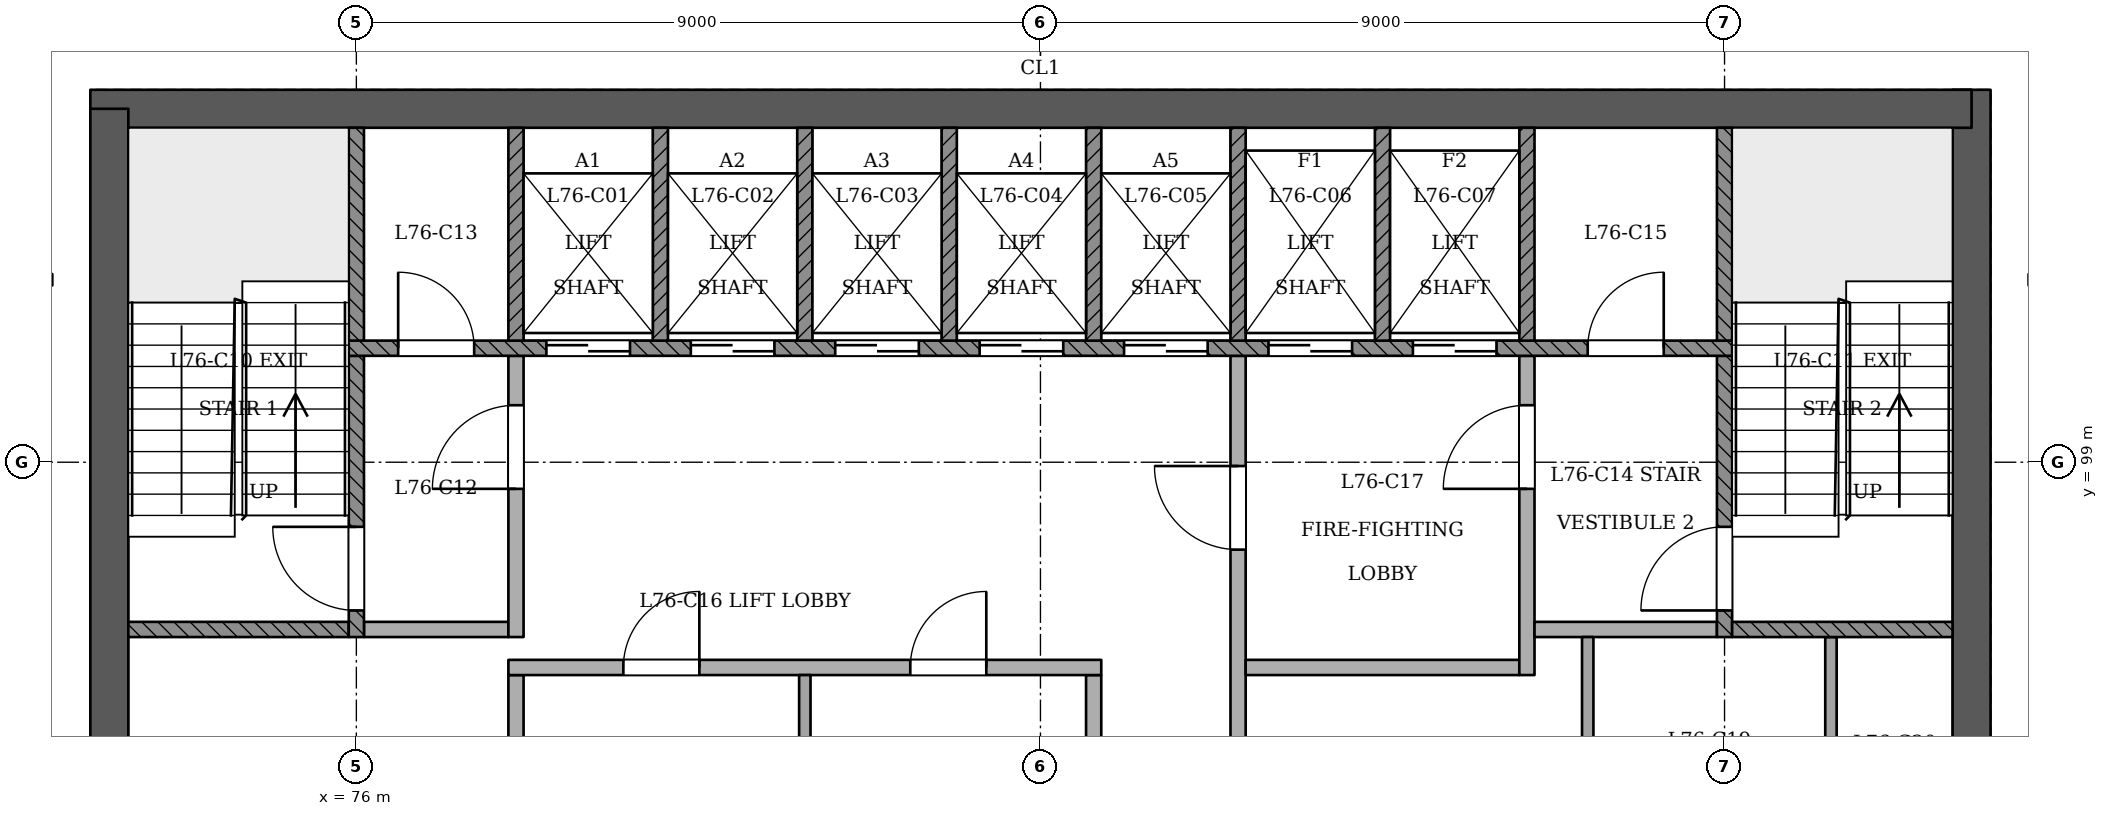
"""IFC4 building model, lengths in metres.
Left out: names, types, materials, properties, quantities, classifications, styles, units other than length and angle.
Written with IfcOpenShell. Run it as: python <this file> out.ifc"""

import sys

from ifc_helpers import new_model, si_unit, direction, frame, frame_2d, origin, place, context, subcontext, project, spatial, rectangle, extrude, element, fill, save


model = new_model("IFC4")
c1 = context("Model", 3, precision=1e-05, world=origin(), true_north=direction((0.0, 1.0)))
c2 = subcontext(c1, "Body", "Model", "MODEL_VIEW")
j1 = project(units=[si_unit("LENGTHUNIT", "METRE"), si_unit("PLANEANGLEUNIT", "RADIAN")], contexts=[c1])
p1 = place(None, origin())
s1 = spatial("IfcSite", under=j1, at=p1, CompositionType="ELEMENT")
p2 = place(p1, origin())
s2 = spatial("IfcBuilding", under=s1, at=p2, CompositionType="ELEMENT")
p3 = place(p2, frame((0.0, 0.0, 295.0)))
s3 = spatial("IfcBuildingStorey", under=s2, at=p3, CompositionType="ELEMENT", Elevation=295.0)
p4 = place(p3, frame((97.25, 93.15, 0.0), z_axis=(0.0, 0.0, 1.0), x_axis=(0.0, 1.0, 0.0)))
e1 = element("IfcWall", 1, at=p4, inside=s3, PredefinedType="SHEAR", context=c2, shape_type="SweptSolid", body=[
    extrude(rectangle(XDim=10.75, YDim=0.5, at=frame_2d((5.375, 0.0))), origin(), (0.0, 0.0, 1.0), 3.6),
])
p5 = place(p3, frame((97.25, 103.65, 0.0), z_axis=(0.0, 0.0, 1.0), x_axis=(-1.0, 0.0, 0.0)))
e2 = element("IfcWall", 2, at=p5, inside=s3, PredefinedType="SHEAR", context=c2, shape_type="SweptSolid", body=[
    extrude(rectangle(XDim=24.75, YDim=0.5, at=frame_2d((12.375, 0.0))), origin(), (0.0, 0.0, 1.0), 3.6),
])
p6 = place(p3, frame((72.75, 103.65, 0.0), z_axis=(0.0, 0.0, 1.0), x_axis=(0.0, -1.0, 0.0)))
e3 = element("IfcWall", 3, at=p6, inside=s3, PredefinedType="SHEAR", context=c2, shape_type="SweptSolid", body=[
    extrude(rectangle(XDim=10.75, YDim=0.5, at=frame_2d((5.375, 0.0))), origin(), (0.0, 0.0, 1.0), 3.6),
])
for number, where, z_axis, x_axis in (
    (4, (99.726, 101.401, 0.0), (0.0, 0.0, 1.0), (-1.0, 0.0, 0.0)),
    (5, (72.0, 101.401, 0.0), (0.0, 0.0, 1.0), (-1.0, -0.0, 0.0)),
):
    element("IfcWall", number, at=place(p3, frame(where, z_axis=z_axis, x_axis=x_axis)), inside=s3, PredefinedType="PARTITIONING", context=c2, shape_type="SweptSolid", body=[
        extrude(rectangle(XDim=1.726, YDim=0.15, at=frame_2d((0.863, 0.0))), origin(), (0.0, 0.0, 1.0), 3.2),
    ])
p7 = place(p3, frame((78.1, 93.4, 0.0), z_axis=(0.0, 0.0, 1.0), x_axis=(0.0, 1.0, 0.0)))
e6 = element("IfcWall", 6, at=p7, inside=s3, PredefinedType="PARTITIONING", context=c2, shape_type="SweptSolid", body=[
    extrude(rectangle(XDim=2.8, YDim=0.2, at=frame_2d((1.4, 0.0))), origin(), (0.0, 0.0, 1.0), 3.2),
])
p8 = place(p3, frame((81.9, 93.4, 0.0), z_axis=(0.0, 0.0, 1.0), x_axis=(0.0, 1.0, 0.0)))
e7 = element("IfcWall", 7, at=p8, inside=s3, PredefinedType="PARTITIONING", context=c2, shape_type="SweptSolid", body=[
    extrude(rectangle(XDim=2.8, YDim=0.15, at=frame_2d((1.4, 0.0))), origin(), (0.0, 0.0, 1.0), 3.2),
])
p9 = place(p3, frame((85.7, 93.4, 0.0), z_axis=(0.0, 0.0, 1.0), x_axis=(0.0, 1.0, 0.0)))
e8 = element("IfcWall", 8, at=p9, inside=s3, PredefinedType="PARTITIONING", context=c2, shape_type="SweptSolid", body=[
    extrude(rectangle(XDim=2.8, YDim=0.2, at=frame_2d((1.4, 0.0))), origin(), (0.0, 0.0, 1.0), 3.2),
])
p10 = place(p3, frame((87.6, 93.4, 0.0), z_axis=(0.0, 0.0, 1.0), x_axis=(0.0, 1.0, 0.0)))
e9 = element("IfcWall", 9, at=p10, inside=s3, PredefinedType="PARTITIONING", context=c2, shape_type="SweptSolid", body=[
    extrude(rectangle(XDim=7.0, YDim=0.2, at=frame_2d((3.5, 0.0))), origin(), (0.0, 0.0, 1.0), 3.2),
])
p11 = place(p10, frame((4.45, 0.0, 0.0)))
e10 = element("IfcOpeningElement", 10, at=p11, cuts=e9, PredefinedType="OPENING", context=c2, shape_type="SweptSolid", body=[
    extrude(rectangle(XDim=1.1, YDim=2.1, at=frame_2d((0.55, 1.05))), frame((0.0, 0.11, 0.0), z_axis=(0.0, -1.0, 0.0), x_axis=(1.0, 0.0, 0.0)), (0.0, 0.0, 1.0), 0.221),
])
for number, where, z_axis, x_axis in (
    (11, (92.2, 93.4, 0.0), (0.0, 0.0, 1.0), (0.0, 1.0, 0.0)),
    (12, (95.4, 93.4, 0.0), (0.0, 0.0, 1.0), (0.0, 1.0, 0.0)),
):
    element("IfcWall", number, at=place(p3, frame(where, z_axis=z_axis, x_axis=x_axis)), inside=s3, PredefinedType="PARTITIONING", context=c2, shape_type="SweptSolid", body=[
        extrude(rectangle(XDim=3.3, YDim=0.15, at=frame_2d((1.65, 0.0))), origin(), (0.0, 0.0, 1.0), 3.2),
    ])
p12 = place(p3, frame((78.0, 96.3, 0.0), z_axis=(0.0, 0.0, 1.0), x_axis=(1.0, 0.0, 0.0)))
e13 = element("IfcWall", 13, at=p12, inside=s3, PredefinedType="PARTITIONING", context=c2, shape_type="SweptSolid", body=[
    extrude(rectangle(XDim=7.8, YDim=0.2, at=frame_2d((3.9, 0.0))), origin(), (0.0, 0.0, 1.0), 3.2),
])
p13 = place(p12, frame((1.512, 0.0, 0.0)))
e14 = element("IfcOpeningElement", 14, at=p13, cuts=e13, PredefinedType="OPENING", context=c2, shape_type="SweptSolid", body=[
    extrude(rectangle(XDim=1.0, YDim=2.1, at=frame_2d((0.5, 1.05))), frame((0.0, 0.11, 0.0), z_axis=(0.0, -1.0, 0.0), x_axis=(1.0, 0.0, 0.0)), (0.0, 0.0, 1.0), 0.221),
])
p14 = place(p12, frame((5.288, 0.0, 0.0)))
e15 = element("IfcOpeningElement", 15, at=p14, cuts=e13, PredefinedType="OPENING", context=c2, shape_type="SweptSolid", body=[
    extrude(rectangle(XDim=1.0, YDim=2.1, at=frame_2d((0.5, 1.05))), frame((0.0, 0.11, 0.0), z_axis=(0.0, -1.0, 0.0), x_axis=(1.0, 0.0, 0.0)), (0.0, 0.0, 1.0), 0.221),
])
p15 = place(p3, frame((87.7, 96.3, 0.0), z_axis=(0.0, 0.0, 1.0), x_axis=(1.0, 0.0, 0.0)))
e16 = element("IfcWall", 16, at=p15, inside=s3, PredefinedType="PARTITIONING", context=c2, shape_type="SweptSolid", body=[
    extrude(rectangle(XDim=3.6, YDim=0.2, at=frame_2d((1.8, 0.0))), origin(), (0.0, 0.0, 1.0), 3.2),
])
p16 = place(p3, frame((91.4, 96.2, 0.0), z_axis=(0.0, 0.0, 1.0), x_axis=(0.0, 1.0, 0.0)))
e17 = element("IfcWall", 17, at=p16, inside=s3, PredefinedType="PARTITIONING", context=c2, shape_type="SweptSolid", body=[
    extrude(rectangle(XDim=4.2, YDim=0.2, at=frame_2d((2.1, 0.0))), origin(), (0.0, 0.0, 1.0), 3.2),
])
p17 = place(p16, frame((2.45, 0.0, 0.0)))
e18 = element("IfcOpeningElement", 18, at=p17, cuts=e17, PredefinedType="OPENING", context=c2, shape_type="SweptSolid", body=[
    extrude(rectangle(XDim=1.1, YDim=2.1, at=frame_2d((0.55, 1.05))), frame((0.0, 0.11, 0.0), z_axis=(0.0, -1.0, 0.0), x_axis=(1.0, 0.0, 0.0)), (0.0, 0.0, 1.0), 0.221),
])
p18 = place(p3, frame((73.0, 96.8, 0.0), z_axis=(0.0, 0.0, 1.0), x_axis=(1.0, 0.0, 0.0)))
e19 = element("IfcWall", 19, at=p18, inside=s3, PredefinedType="SOLIDWALL", context=c2, shape_type="SweptSolid", body=[
    extrude(rectangle(XDim=2.9, YDim=0.2, at=frame_2d((1.45, 0.0))), origin(), (0.0, 0.0, 1.0), 3.2),
])
p19 = place(p3, frame((76.0, 96.7, 0.0), z_axis=(0.0, 0.0, 1.0), x_axis=(0.0, 1.0, 0.0)))
e20 = element("IfcWall", 20, at=p19, inside=s3, PredefinedType="SOLIDWALL", context=c2, shape_type="SweptSolid", body=[
    extrude(rectangle(XDim=3.7, YDim=0.2, at=frame_2d((1.85, 0.0))), origin(), (0.0, 0.0, 1.0), 3.2),
])
p20 = place(p19, frame((0.35, 0.0, 0.0)))
e21 = element("IfcOpeningElement", 21, at=p20, cuts=e20, PredefinedType="OPENING", context=c2, shape_type="SweptSolid", body=[
    extrude(rectangle(XDim=1.1, YDim=2.1, at=frame_2d((0.55, 1.05))), frame((0.0, 0.11, 0.0), z_axis=(0.0, -1.0, 0.0), x_axis=(1.0, 0.0, 0.0)), (0.0, 0.0, 1.0), 0.221),
])
p21 = place(p3, frame((76.1, 96.8, 0.0), z_axis=(0.0, 0.0, 1.0), x_axis=(1.0, 0.0, 0.0)))
e22 = element("IfcWall", 22, at=p21, inside=s3, PredefinedType="PARTITIONING", context=c2, shape_type="SweptSolid", body=[
    extrude(rectangle(XDim=1.9, YDim=0.2, at=frame_2d((0.95, 0.0))), origin(), (0.0, 0.0, 1.0), 3.2),
])
p22 = place(p3, frame((78.1, 96.7, 0.0), z_axis=(0.0, 0.0, 1.0), x_axis=(0.0, 1.0, 0.0)))
e23 = element("IfcWall", 23, at=p22, inside=s3, PredefinedType="PARTITIONING", context=c2, shape_type="SweptSolid", body=[
    extrude(rectangle(XDim=3.7, YDim=0.2, at=frame_2d((1.85, 0.0))), origin(), (0.0, 0.0, 1.0), 3.2),
])
p23 = place(p22, frame((1.95, 0.0, 0.0)))
e24 = element("IfcOpeningElement", 24, at=p23, cuts=e23, PredefinedType="OPENING", context=c2, shape_type="SweptSolid", body=[
    extrude(rectangle(XDim=1.1, YDim=2.1, at=frame_2d((0.55, 1.05))), frame((0.0, 0.11, 0.0), z_axis=(0.0, -1.0, 0.0), x_axis=(1.0, 0.0, 0.0)), (0.0, 0.0, 1.0), 0.221),
])
p24 = place(p3, frame((91.5, 96.8, 0.0), z_axis=(0.0, 0.0, 1.0), x_axis=(1.0, 0.0, 0.0)))
e25 = element("IfcWall", 25, at=p24, inside=s3, PredefinedType="PARTITIONING", context=c2, shape_type="SweptSolid", body=[
    extrude(rectangle(XDim=2.4, YDim=0.2, at=frame_2d((1.2, 0.0))), origin(), (0.0, 0.0, 1.0), 3.2),
])
p25 = place(p3, frame((94.0, 96.7, 0.0), z_axis=(0.0, 0.0, 1.0), x_axis=(0.0, 1.0, 0.0)))
e26 = element("IfcWall", 26, at=p25, inside=s3, PredefinedType="SOLIDWALL", context=c2, shape_type="SweptSolid", body=[
    extrude(rectangle(XDim=3.7, YDim=0.2, at=frame_2d((1.85, 0.0))), origin(), (0.0, 0.0, 1.0), 3.2),
])
p26 = place(p25, frame((0.35, 0.0, 0.0)))
e27 = element("IfcOpeningElement", 27, at=p26, cuts=e26, PredefinedType="OPENING", context=c2, shape_type="SweptSolid", body=[
    extrude(rectangle(XDim=1.1, YDim=2.1, at=frame_2d((0.55, 1.05))), frame((0.0, 0.11, 0.0), z_axis=(0.0, -1.0, 0.0), x_axis=(1.0, 0.0, 0.0)), (0.0, 0.0, 1.0), 0.221),
])
p27 = place(p3, frame((94.1, 96.8, 0.0), z_axis=(0.0, 0.0, 1.0), x_axis=(1.0, 0.0, 0.0)))
e28 = element("IfcWall", 28, at=p27, inside=s3, PredefinedType="SOLIDWALL", context=c2, shape_type="SweptSolid", body=[
    extrude(rectangle(XDim=2.9, YDim=0.2, at=frame_2d((1.45, 0.0))), origin(), (0.0, 0.0, 1.0), 3.2),
])
p28 = place(p3, frame((75.9, 100.5, 0.0), z_axis=(0.0, 0.0, 1.0), x_axis=(1.0, 0.0, 0.0)))
e29 = element("IfcWall", 29, at=p28, inside=s3, PredefinedType="SOLIDWALL", context=c2, shape_type="SweptSolid", body=[
    extrude(rectangle(XDim=18.2, YDim=0.2, at=frame_2d((9.1, 0.0))), origin(), (0.0, 0.0, 1.0), 3.2),
])
p29 = place(p28, frame((2.6, 0.0, 0.0)))
e30 = element("IfcOpeningElement", 30, at=p29, cuts=e29, PredefinedType="OPENING", context=c2, shape_type="SweptSolid", body=[
    extrude(rectangle(XDim=1.1, YDim=2.1, at=frame_2d((0.55, 1.05))), frame((0.0, 0.11, 0.0), z_axis=(0.0, -1.0, 0.0), x_axis=(1.0, 0.0, 0.0)), (0.0, 0.0, 1.0), 0.221),
])
p30 = place(p28, frame((4.5, 0.0, 0.0)))
e31 = element("IfcOpeningElement", 31, at=p30, cuts=e29, PredefinedType="OPENING", context=c2, shape_type="SweptSolid", body=[
    extrude(rectangle(XDim=1.1, YDim=2.1, at=frame_2d((0.55, 1.05))), frame((0.0, 0.11, 0.0), z_axis=(0.0, -1.0, 0.0), x_axis=(1.0, 0.0, 0.0)), (0.0, 0.0, 1.0), 0.221),
])
p31 = place(p28, frame((6.4, 0.0, 0.0)))
e32 = element("IfcOpeningElement", 32, at=p31, cuts=e29, PredefinedType="OPENING", context=c2, shape_type="SweptSolid", body=[
    extrude(rectangle(XDim=1.1, YDim=2.1, at=frame_2d((0.55, 1.05))), frame((0.0, 0.11, 0.0), z_axis=(0.0, -1.0, 0.0), x_axis=(1.0, 0.0, 0.0)), (0.0, 0.0, 1.0), 0.221),
])
p32 = place(p28, frame((8.3, 0.0, 0.0)))
e33 = element("IfcOpeningElement", 33, at=p32, cuts=e29, PredefinedType="OPENING", context=c2, shape_type="SweptSolid", body=[
    extrude(rectangle(XDim=1.1, YDim=2.1, at=frame_2d((0.55, 1.05))), frame((0.0, 0.11, 0.0), z_axis=(0.0, -1.0, 0.0), x_axis=(1.0, 0.0, 0.0)), (0.0, 0.0, 1.0), 0.221),
])
p33 = place(p28, frame((10.2, 0.0, 0.0)))
e34 = element("IfcOpeningElement", 34, at=p33, cuts=e29, PredefinedType="OPENING", context=c2, shape_type="SweptSolid", body=[
    extrude(rectangle(XDim=1.1, YDim=2.1, at=frame_2d((0.55, 1.05))), frame((0.0, 0.11, 0.0), z_axis=(0.0, -1.0, 0.0), x_axis=(1.0, 0.0, 0.0)), (0.0, 0.0, 1.0), 0.221),
])
p34 = place(p28, frame((12.1, 0.0, 0.0)))
e35 = element("IfcOpeningElement", 35, at=p34, cuts=e29, PredefinedType="OPENING", context=c2, shape_type="SweptSolid", body=[
    extrude(rectangle(XDim=1.1, YDim=2.1, at=frame_2d((0.55, 1.05))), frame((0.0, 0.11, 0.0), z_axis=(0.0, -1.0, 0.0), x_axis=(1.0, 0.0, 0.0)), (0.0, 0.0, 1.0), 0.221),
])
p35 = place(p28, frame((14.0, 0.0, 0.0)))
e36 = element("IfcOpeningElement", 36, at=p35, cuts=e29, PredefinedType="OPENING", context=c2, shape_type="SweptSolid", body=[
    extrude(rectangle(XDim=1.1, YDim=2.1, at=frame_2d((0.55, 1.05))), frame((0.0, 0.11, 0.0), z_axis=(0.0, -1.0, 0.0), x_axis=(1.0, 0.0, 0.0)), (0.0, 0.0, 1.0), 0.221),
])
p36 = place(p28, frame((0.65, 0.0, 0.0)))
e37 = element("IfcOpeningElement", 37, at=p36, cuts=e29, PredefinedType="OPENING", context=c2, shape_type="SweptSolid", body=[
    extrude(rectangle(XDim=1.0, YDim=2.1, at=frame_2d((0.5, 1.05))), frame((0.0, 0.11, 0.0), z_axis=(0.0, -1.0, 0.0), x_axis=(1.0, 0.0, 0.0)), (0.0, 0.0, 1.0), 0.221),
])
p37 = place(p28, frame((16.3, 0.0, 0.0)))
e38 = element("IfcOpeningElement", 38, at=p37, cuts=e29, PredefinedType="OPENING", context=c2, shape_type="SweptSolid", body=[
    extrude(rectangle(XDim=1.0, YDim=2.1, at=frame_2d((0.5, 1.05))), frame((0.0, 0.11, 0.0), z_axis=(0.0, -1.0, 0.0), x_axis=(1.0, 0.0, 0.0)), (0.0, 0.0, 1.0), 0.221),
])
for number, where, z_axis, x_axis in (
    (39, (76.0, 100.6, 0.0), (0.0, 0.0, 1.0), (0.0, 1.0, 0.0)),
    (40, (78.1, 100.6, 0.0), (0.0, 0.0, 1.0), (0.0, 1.0, 0.0)),
    (41, (80.0, 100.6, 0.0), (0.0, 0.0, 1.0), (0.0, 1.0, 0.0)),
    (42, (81.9, 100.6, 0.0), (0.0, 0.0, 1.0), (0.0, 1.0, 0.0)),
    (43, (83.8, 100.6, 0.0), (0.0, 0.0, 1.0), (0.0, 1.0, 0.0)),
    (44, (85.7, 100.6, 0.0), (0.0, 0.0, 1.0), (0.0, 1.0, 0.0)),
    (45, (87.6, 100.6, 0.0), (0.0, 0.0, 1.0), (0.0, 1.0, 0.0)),
    (46, (89.5, 100.6, 0.0), (0.0, 0.0, 1.0), (0.0, 1.0, 0.0)),
    (47, (91.4, 100.6, 0.0), (0.0, 0.0, 1.0), (0.0, 1.0, 0.0)),
    (48, (94.0, 100.6, 0.0), (0.0, 0.0, 1.0), (0.0, 1.0, 0.0)),
):
    element("IfcWall", number, at=place(p3, frame(where, z_axis=z_axis, x_axis=x_axis)), inside=s3, PredefinedType="SOLIDWALL", context=c2, shape_type="SweptSolid", body=[
        extrude(rectangle(XDim=2.8, YDim=0.2, at=frame_2d((1.4, 0.0))), origin(), (0.0, 0.0, 1.0), 3.2),
    ])
p38 = place(p29, origin())
e49 = element("IfcDoor", 49, at=p38, inside=s3, OperationType="SLIDING_TO_RIGHT", PredefinedType="NOTDEFINED", context=c2, shape_type="SweptSolid", body=[
    extrude(rectangle(XDim=1.1, YDim=2.1, at=frame_2d((0.55, 1.05))), frame((0.0, 0.025, 0.0), z_axis=(0.0, -1.0, 0.0), x_axis=(1.0, 0.0, 0.0)), (0.0, 0.0, 1.0), 0.05),
])
fill(e30, e49)
p39 = place(p30, origin())
e50 = element("IfcDoor", 50, at=p39, inside=s3, OperationType="SLIDING_TO_LEFT", PredefinedType="NOTDEFINED", context=c2, shape_type="SweptSolid", body=[
    extrude(rectangle(XDim=1.1, YDim=2.1, at=frame_2d((0.55, 1.05))), frame((0.0, 0.025, 0.0), z_axis=(0.0, -1.0, 0.0), x_axis=(1.0, 0.0, 0.0)), (0.0, 0.0, 1.0), 0.05),
])
fill(e31, e50)
p40 = place(p31, origin())
e51 = element("IfcDoor", 51, at=p40, inside=s3, OperationType="SLIDING_TO_RIGHT", PredefinedType="NOTDEFINED", context=c2, shape_type="SweptSolid", body=[
    extrude(rectangle(XDim=1.1, YDim=2.1, at=frame_2d((0.55, 1.05))), frame((0.0, 0.025, 0.0), z_axis=(0.0, -1.0, 0.0), x_axis=(1.0, 0.0, 0.0)), (0.0, 0.0, 1.0), 0.05),
])
fill(e32, e51)
p41 = place(p32, origin())
e52 = element("IfcDoor", 52, at=p41, inside=s3, OperationType="SLIDING_TO_LEFT", PredefinedType="NOTDEFINED", context=c2, shape_type="SweptSolid", body=[
    extrude(rectangle(XDim=1.1, YDim=2.1, at=frame_2d((0.55, 1.05))), frame((0.0, 0.025, 0.0), z_axis=(0.0, -1.0, 0.0), x_axis=(1.0, 0.0, 0.0)), (0.0, 0.0, 1.0), 0.05),
])
fill(e33, e52)
p42 = place(p33, origin())
e53 = element("IfcDoor", 53, at=p42, inside=s3, OperationType="SLIDING_TO_RIGHT", PredefinedType="NOTDEFINED", context=c2, shape_type="SweptSolid", body=[
    extrude(rectangle(XDim=1.1, YDim=2.1, at=frame_2d((0.55, 1.05))), frame((0.0, 0.025, 0.0), z_axis=(0.0, -1.0, 0.0), x_axis=(1.0, 0.0, 0.0)), (0.0, 0.0, 1.0), 0.05),
])
fill(e34, e53)
p43 = place(p34, origin())
e54 = element("IfcDoor", 54, at=p43, inside=s3, OperationType="SLIDING_TO_RIGHT", PredefinedType="NOTDEFINED", context=c2, shape_type="SweptSolid", body=[
    extrude(rectangle(XDim=1.1, YDim=2.1, at=frame_2d((0.55, 1.05))), frame((0.0, 0.025, 0.0), z_axis=(0.0, -1.0, 0.0), x_axis=(1.0, 0.0, 0.0)), (0.0, 0.0, 1.0), 0.05),
])
fill(e35, e54)
p44 = place(p35, origin())
e55 = element("IfcDoor", 55, at=p44, inside=s3, OperationType="SLIDING_TO_LEFT", PredefinedType="NOTDEFINED", context=c2, shape_type="SweptSolid", body=[
    extrude(rectangle(XDim=1.1, YDim=2.1, at=frame_2d((0.55, 1.05))), frame((0.0, 0.025, 0.0), z_axis=(0.0, -1.0, 0.0), x_axis=(1.0, 0.0, 0.0)), (0.0, 0.0, 1.0), 0.05),
])
fill(e36, e55)
p45 = place(p20, origin())
e56 = element("IfcDoor", 56, at=p45, inside=s3, OperationType="SINGLE_SWING_RIGHT", PredefinedType="NOTDEFINED", context=c2, shape_type="SweptSolid", body=[
    extrude(rectangle(XDim=1.1, YDim=2.1, at=frame_2d((0.55, 1.05))), frame((0.0, 0.025, 0.0), z_axis=(0.0, -1.0, 0.0), x_axis=(1.0, 0.0, 0.0)), (0.0, 0.0, 1.0), 0.05),
])
fill(e21, e56)
p46 = place(p26, origin())
e57 = element("IfcDoor", 57, at=p46, inside=s3, OperationType="SINGLE_SWING_LEFT", PredefinedType="NOTDEFINED", context=c2, shape_type="SweptSolid", body=[
    extrude(rectangle(XDim=1.1, YDim=2.1, at=frame_2d((0.55, 1.05))), frame((0.0, 0.025, 0.0), z_axis=(0.0, -1.0, 0.0), x_axis=(1.0, 0.0, 0.0)), (0.0, 0.0, 1.0), 0.05),
])
fill(e27, e57)
p47 = place(p23, origin())
e58 = element("IfcDoor", 58, at=p47, inside=s3, OperationType="SINGLE_SWING_LEFT", PredefinedType="NOTDEFINED", context=c2, shape_type="SweptSolid", body=[
    extrude(rectangle(XDim=1.1, YDim=2.1, at=frame_2d((0.55, 1.05))), frame((0.0, 0.025, 0.0), z_axis=(0.0, -1.0, 0.0), x_axis=(1.0, 0.0, 0.0)), (0.0, 0.0, 1.0), 0.05),
])
fill(e24, e58)
p48 = place(p11, origin())
e59 = element("IfcDoor", 59, at=p48, inside=s3, OperationType="SINGLE_SWING_RIGHT", PredefinedType="NOTDEFINED", context=c2, shape_type="SweptSolid", body=[
    extrude(rectangle(XDim=1.1, YDim=2.1, at=frame_2d((0.55, 1.05))), frame((0.0, 0.025, 0.0), z_axis=(0.0, -1.0, 0.0), x_axis=(1.0, 0.0, 0.0)), (0.0, 0.0, 1.0), 0.05),
])
fill(e10, e59)
p49 = place(p17, origin())
e60 = element("IfcDoor", 60, at=p49, inside=s3, OperationType="SINGLE_SWING_LEFT", PredefinedType="NOTDEFINED", context=c2, shape_type="SweptSolid", body=[
    extrude(rectangle(XDim=1.1, YDim=2.1, at=frame_2d((0.55, 1.05))), frame((0.0, 0.025, 0.0), z_axis=(0.0, -1.0, 0.0), x_axis=(1.0, 0.0, 0.0)), (0.0, 0.0, 1.0), 0.05),
])
fill(e18, e60)
p50 = place(p36, origin())
e61 = element("IfcDoor", 61, at=p50, inside=s3, OperationType="SINGLE_SWING_LEFT", PredefinedType="NOTDEFINED", context=c2, shape_type="SweptSolid", body=[
    extrude(rectangle(XDim=1.0, YDim=2.1, at=frame_2d((0.5, 1.05))), frame((0.0, 0.025, 0.0), z_axis=(0.0, -1.0, 0.0), x_axis=(1.0, 0.0, 0.0)), (0.0, 0.0, 1.0), 0.05),
])
fill(e37, e61)
p51 = place(p37, origin())
e62 = element("IfcDoor", 62, at=p51, inside=s3, OperationType="SINGLE_SWING_RIGHT", PredefinedType="NOTDEFINED", context=c2, shape_type="SweptSolid", body=[
    extrude(rectangle(XDim=1.0, YDim=2.1, at=frame_2d((0.5, 1.05))), frame((0.0, 0.025, 0.0), z_axis=(0.0, -1.0, 0.0), x_axis=(1.0, 0.0, 0.0)), (0.0, 0.0, 1.0), 0.05),
])
fill(e38, e62)
p52 = place(p13, origin())
e63 = element("IfcDoor", 63, at=p52, inside=s3, OperationType="SINGLE_SWING_RIGHT", PredefinedType="NOTDEFINED", context=c2, shape_type="SweptSolid", body=[
    extrude(rectangle(XDim=1.0, YDim=2.1, at=frame_2d((0.5, 1.05))), frame((0.0, 0.025, 0.0), z_axis=(0.0, -1.0, 0.0), x_axis=(1.0, 0.0, 0.0)), (0.0, 0.0, 1.0), 0.05),
])
fill(e14, e63)
p53 = place(p14, origin())
e64 = element("IfcDoor", 64, at=p53, inside=s3, OperationType="SINGLE_SWING_RIGHT", PredefinedType="NOTDEFINED", context=c2, shape_type="SweptSolid", body=[
    extrude(rectangle(XDim=1.0, YDim=2.1, at=frame_2d((0.5, 1.05))), frame((0.0, 0.025, 0.0), z_axis=(0.0, -1.0, 0.0), x_axis=(1.0, 0.0, 0.0)), (0.0, 0.0, 1.0), 0.05),
])
fill(e15, e64)
save(model, sys.argv[1])
